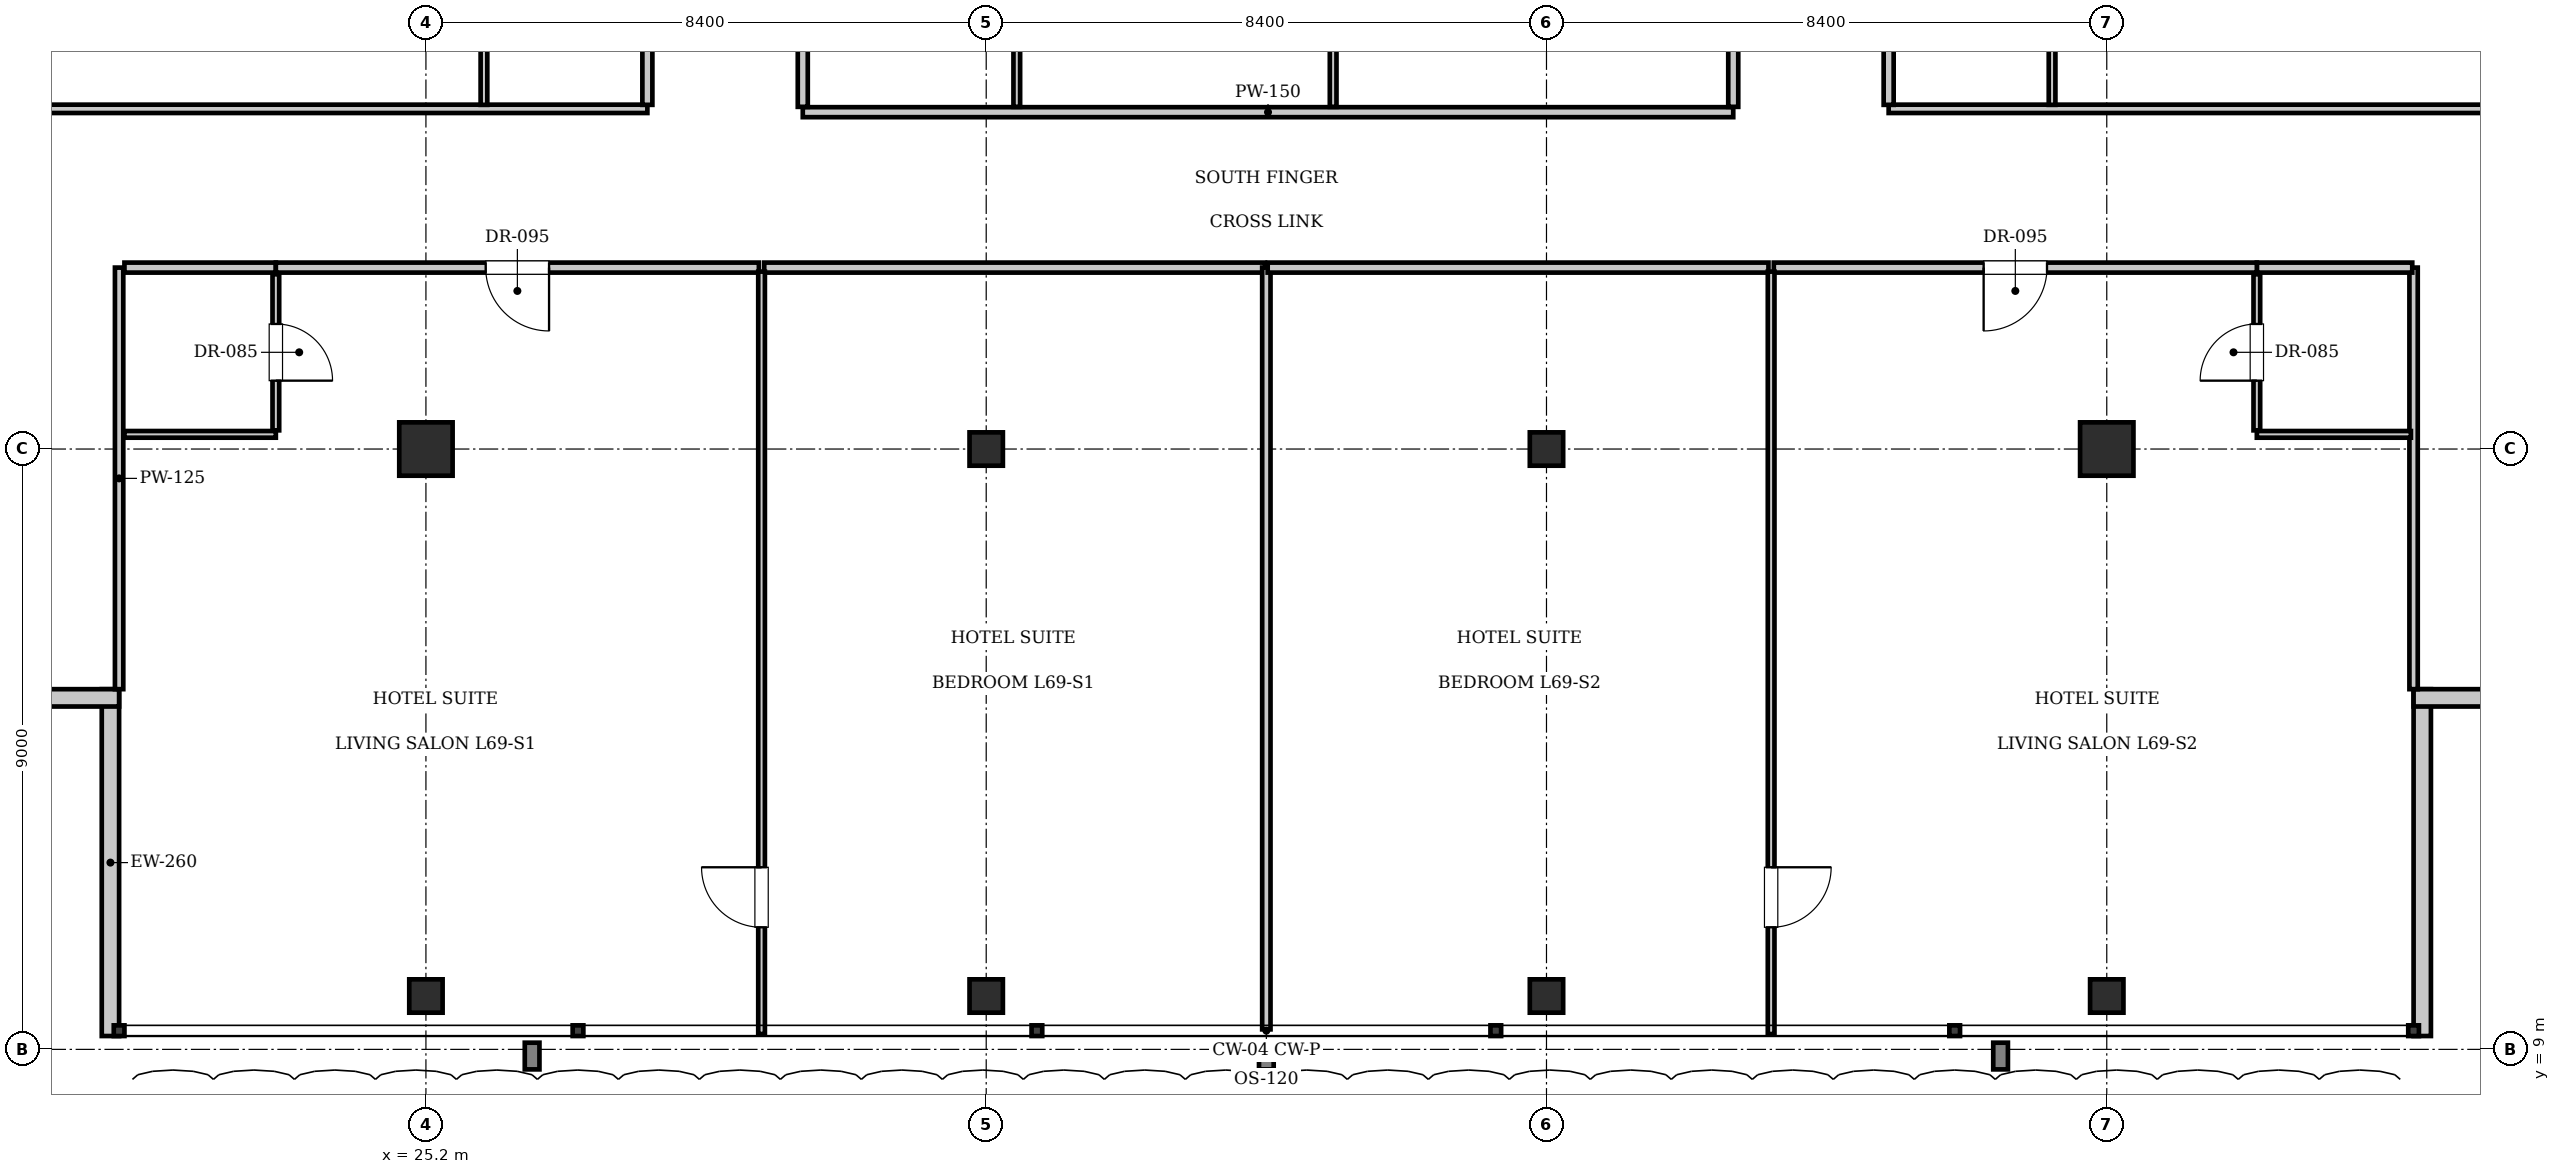
"""IFC4 building model, lengths in metres.
Left out: names, types, materials, properties, quantities, classifications, styles, units other than length and angle.
Written with IfcOpenShell. Run it as: python <this file> out.ifc"""

import sys

from ifc_helpers import new_model, si_unit, direction, frame, frame_2d, origin, origin_2d, place, context, subcontext, project, spatial, rectangle, i_section, extrude, element, fill, save


model = new_model("IFC4")
c1 = context("Model", 3, precision=1e-05, world=origin(), true_north=direction((0.0, 1.0)))
c2 = subcontext(c1, "Body", "Model", "MODEL_VIEW")
j1 = project(units=[si_unit("LENGTHUNIT", "METRE"), si_unit("PLANEANGLEUNIT", "RADIAN")], contexts=[c1])
p1 = place(None, origin())
s1 = spatial("IfcSite", under=j1, at=p1, CompositionType="ELEMENT")
p2 = place(p1, origin())
s2 = spatial("IfcBuilding", under=s1, at=p2, CompositionType="ELEMENT")
p3 = place(p2, frame((0.0, 0.0, 281.75)))
s3 = spatial("IfcBuildingStorey", under=s2, at=p3, CompositionType="ELEMENT", Elevation=281.75)
for number, where, z_axis, x_axis in (
    (1, (25.2, 18.0, 0.0), (0.0, 0.0, 1.0), (1.0, 0.0, 0.0)),
    (2, (50.4, 18.0, 0.0), (0.0, 0.0, 1.0), (1.0, 0.0, 0.0)),
):
    element("IfcColumn", number, at=place(p3, frame(where, z_axis=z_axis, x_axis=x_axis)), inside=s3, PredefinedType="COLUMN", context=c2, shape_type="SweptSolid", body=[
        extrude(rectangle(XDim=0.8, YDim=0.8, at=origin_2d()), origin(), (0.0, 0.0, 1.0), 3.85),
    ])
for number, where, z_axis, x_axis in (
    (3, (33.6, 18.0, 0.0), (0.0, 0.0, 1.0), (1.0, 0.0, 0.0)),
    (4, (42.0, 18.0, 0.0), (0.0, 0.0, 1.0), (1.0, 0.0, 0.0)),
    (5, (25.2, 9.8, 0.0), (0.0, 0.0, 1.0), (1.0, 0.0, 0.0)),
    (6, (33.6, 9.8, 0.0), (0.0, 0.0, 1.0), (1.0, 0.0, 0.0)),
    (7, (42.0, 9.8, 0.0), (0.0, 0.0, 1.0), (1.0, 0.0, 0.0)),
    (8, (50.4, 9.8, 0.0), (0.0, 0.0, 1.0), (1.0, 0.0, 0.0)),
):
    element("IfcColumn", number, at=place(p3, frame(where, z_axis=z_axis, x_axis=x_axis)), inside=s3, PredefinedType="COLUMN", context=c2, shape_type="SweptSolid", body=[
        extrude(i_section(OverallWidth=0.5, OverallDepth=0.5, WebThickness=0.022, FlangeThickness=0.032, at=origin_2d()), origin(), (0.0, 0.0, 1.0), 3.85),
    ])
p4 = place(p3, frame((20.47, 9.2, 0.0), z_axis=(0.0, 0.0, 1.0), x_axis=(0.0, 1.0, 0.0)))
e9 = element("IfcWall", 9, at=p4, inside=s3, PredefinedType="SOLIDWALL", context=c2, shape_type="SweptSolid", body=[
    extrude(rectangle(XDim=5.2, YDim=0.26, at=frame_2d((2.6, 0.0))), origin(), (0.0, 0.0, 1.0), 3.61),
])
p5 = place(p3, frame((20.6, 14.27, 0.0), z_axis=(0.0, 0.0, 1.0), x_axis=(-1.0, 0.0, 0.0)))
e10 = element("IfcWall", 10, at=p5, inside=s3, PredefinedType="SOLIDWALL", context=c2, shape_type="SweptSolid", body=[
    extrude(rectangle(XDim=5.2, YDim=0.26, at=frame_2d((2.6, 0.0))), origin(), (0.0, 0.0, 1.0), 3.61),
])
p6 = place(p5, frame((1.6, 0.0, 0.9)))
e11 = element("IfcOpeningElement", 11, at=p6, cuts=e10, PredefinedType="OPENING", context=c2, shape_type="SweptSolid", body=[
    extrude(rectangle(XDim=2.0, YDim=2.2, at=frame_2d((1.0, 1.1))), frame((0.0, 0.14, 0.0), z_axis=(0.0, -1.0, 0.0), x_axis=(1.0, 0.0, 0.0)), (0.0, 0.0, 1.0), 0.28),
])
p7 = place(p3, frame((55.13, 14.4, 0.0), z_axis=(0.0, 0.0, 1.0), x_axis=(0.0, -1.0, 0.0)))
e12 = element("IfcWall", 12, at=p7, inside=s3, PredefinedType="SOLIDWALL", context=c2, shape_type="SweptSolid", body=[
    extrude(rectangle(XDim=5.2, YDim=0.26, at=frame_2d((2.6, 0.0))), origin(), (0.0, 0.0, 1.0), 3.61),
])
p8 = place(p3, frame((60.2, 14.27, 0.0), z_axis=(0.0, 0.0, 1.0), x_axis=(-1.0, 0.0, 0.0)))
e13 = element("IfcWall", 13, at=p8, inside=s3, PredefinedType="SOLIDWALL", context=c2, shape_type="SweptSolid", body=[
    extrude(rectangle(XDim=5.2, YDim=0.26, at=frame_2d((2.6, 0.0))), origin(), (0.0, 0.0, 1.0), 3.61),
])
p9 = place(p8, frame((1.6, 0.0, 0.9)))
e14 = element("IfcOpeningElement", 14, at=p9, cuts=e13, PredefinedType="OPENING", context=c2, shape_type="SweptSolid", body=[
    extrude(rectangle(XDim=2.0, YDim=2.2, at=frame_2d((1.0, 1.1))), frame((0.0, 0.14, 0.0), z_axis=(0.0, -1.0, 0.0), x_axis=(1.0, 0.0, 0.0)), (0.0, 0.0, 1.0), 0.28),
])
p10 = place(p3, frame((30.85, 23.05, 0.0), z_axis=(0.0, 0.0, 1.0), x_axis=(1.0, 0.0, 0.0)))
e15 = element("IfcWall", 15, at=p10, inside=s3, PredefinedType="PARTITIONING", context=c2, shape_type="SweptSolid", body=[
    extrude(rectangle(XDim=13.95, YDim=0.15, at=frame_2d((6.975, 0.0))), origin(), (0.0, 0.0, 1.0), 3.61),
])
for number, where, z_axis, x_axis in (
    (16, (30.85, 23.13, 0.0), (0.0, 0.0, 1.0), (0.0, 1.0, 0.0)),
    (17, (44.8, 23.13, 0.0), (0.0, 0.0, 1.0), (0.0, 1.0, 0.0)),
):
    element("IfcWall", number, at=place(p3, frame(where, z_axis=z_axis, x_axis=x_axis)), inside=s3, PredefinedType="PARTITIONING", context=c2, shape_type="SweptSolid", body=[
        extrude(rectangle(XDim=7.89, YDim=0.15, at=frame_2d((3.945, 0.0))), origin(), (0.0, 0.0, 1.0), 3.61),
    ])
for number, where, z_axis, x_axis in (
    (18, (34.059, 23.13, 0.0), (0.0, 0.0, 1.0), (0.0, 1.0, 0.0)),
    (19, (38.802, 23.13, 0.0), (0.0, 0.0, 1.0), (0.0, 1.0, 0.0)),
):
    element("IfcWall", number, at=place(p3, frame(where, z_axis=z_axis, x_axis=x_axis)), inside=s3, PredefinedType="PARTITIONING", context=c2, shape_type="SweptSolid", body=[
        extrude(rectangle(XDim=7.89, YDim=0.1, at=frame_2d((3.945, 0.0))), origin(), (0.0, 0.0, 1.0), 3.61),
    ])
for number, where, z_axis, x_axis in (
    (20, (20.6, 14.4, 0.0), (0.0, 0.0, 1.0), (0.0, 1.0, 0.0)),
    (21, (55.0, 14.4, 0.0), (0.0, 0.0, 1.0), (0.0, 1.0, 0.0)),
):
    element("IfcWall", number, at=place(p3, frame(where, z_axis=z_axis, x_axis=x_axis)), inside=s3, PredefinedType="PARTITIONING", context=c2, shape_type="SweptSolid", body=[
        extrude(rectangle(XDim=6.32, YDim=0.125, at=frame_2d((3.16, 0.0))), origin(), (0.0, 0.0, 1.0), 3.61),
    ])
p11 = place(p3, frame((20.68, 20.72, 0.0), z_axis=(0.0, 0.0, 1.0), x_axis=(1.0, 0.0, 0.0)))
e22 = element("IfcWall", 22, at=p11, inside=s3, PredefinedType="PARTITIONING", context=c2, shape_type="SweptSolid", body=[
    extrude(rectangle(XDim=2.27, YDim=0.15, at=frame_2d((1.135, 0.0))), origin(), (0.0, 0.0, 1.0), 3.61),
])
p12 = place(p3, frame((20.68, 18.22, 0.0), z_axis=(0.0, 0.0, 1.0), x_axis=(1.0, 0.0, 0.0)))
e23 = element("IfcWall", 23, at=p12, inside=s3, PredefinedType="PARTITIONING", context=c2, shape_type="SweptSolid", body=[
    extrude(rectangle(XDim=2.27, YDim=0.1, at=frame_2d((1.135, 0.0))), origin(), (0.0, 0.0, 1.0), 3.61),
])
p13 = place(p3, frame((22.95, 18.28, 0.0), z_axis=(0.0, 0.0, 1.0), x_axis=(0.0, 1.0, 0.0)))
e24 = element("IfcWall", 24, at=p13, inside=s3, PredefinedType="PARTITIONING", context=c2, shape_type="SweptSolid", body=[
    extrude(rectangle(XDim=2.34, YDim=0.1, at=frame_2d((1.17, 0.0))), origin(), (0.0, 0.0, 1.0), 3.61),
])
p14 = place(p13, frame((0.745, 0.0, 0.0)))
e25 = element("IfcOpeningElement", 25, at=p14, cuts=e24, PredefinedType="OPENING", context=c2, shape_type="SweptSolid", body=[
    extrude(rectangle(XDim=0.85, YDim=2.1, at=frame_2d((0.425, 1.05))), frame((0.0, 0.06, 0.0), z_axis=(0.0, -1.0, 0.0), x_axis=(1.0, 0.0, 0.0)), (0.0, 0.0, 1.0), 0.12),
])
p15 = place(p3, frame((22.95, 20.72, 0.0), z_axis=(0.0, 0.0, 1.0), x_axis=(1.0, 0.0, 0.0)))
e26 = element("IfcWall", 26, at=p15, inside=s3, PredefinedType="PARTITIONING", context=c2, shape_type="SweptSolid", body=[
    extrude(rectangle(XDim=7.242, YDim=0.15, at=frame_2d((3.621, 0.0))), origin(), (0.0, 0.0, 1.0), 3.61),
])
p16 = place(p15, frame((3.146, 0.0, 0.0)))
e27 = element("IfcOpeningElement", 27, at=p16, cuts=e26, PredefinedType="OPENING", context=c2, shape_type="SweptSolid", body=[
    extrude(rectangle(XDim=0.95, YDim=2.15, at=frame_2d((0.475, 1.075))), frame((0.0, 0.085, 0.0), z_axis=(0.0, -1.0, 0.0), x_axis=(1.0, 0.0, 0.0)), (0.0, 0.0, 1.0), 0.17),
])
p17 = place(p3, frame((30.272, 20.72, 0.0), z_axis=(0.0, 0.0, 1.0), x_axis=(1.0, 0.0, 0.0)))
e28 = element("IfcWall", 28, at=p17, inside=s3, PredefinedType="PARTITIONING", context=c2, shape_type="SweptSolid", body=[
    extrude(rectangle(XDim=7.508, YDim=0.15, at=frame_2d((3.754, 0.0))), origin(), (0.0, 0.0, 1.0), 3.61),
])
p18 = place(p3, frame((30.232, 9.23, 0.0), z_axis=(0.0, 0.0, 1.0), x_axis=(0.0, 1.0, 0.0)))
e29 = element("IfcWall", 29, at=p18, inside=s3, PredefinedType="PARTITIONING", context=c2, shape_type="SweptSolid", body=[
    extrude(rectangle(XDim=11.43, YDim=0.1, at=frame_2d((5.715, 0.0))), origin(), (0.0, 0.0, 1.0), 3.61),
])
p19 = place(p18, frame((1.6, 0.0, 0.0)))
e30 = element("IfcOpeningElement", 30, at=p19, cuts=e29, PredefinedType="OPENING", context=c2, shape_type="SweptSolid", body=[
    extrude(rectangle(XDim=0.9, YDim=2.1, at=frame_2d((0.45, 1.05))), frame((0.0, 0.06, 0.0), z_axis=(0.0, -1.0, 0.0), x_axis=(1.0, 0.0, 0.0)), (0.0, 0.0, 1.0), 0.12),
])
p20 = place(p3, frame((37.8, 9.3, 0.0), z_axis=(0.0, 0.0, 1.0), x_axis=(0.0, 1.0, 0.0)))
e31 = element("IfcWall", 31, at=p20, inside=s3, PredefinedType="PARTITIONING", context=c2, shape_type="SweptSolid", body=[
    extrude(rectangle(XDim=11.42, YDim=0.125, at=frame_2d((5.71, 0.0))), origin(), (0.0, 0.0, 1.0), 3.3),
])
p21 = place(p3, frame((52.65, 20.72, 0.0), z_axis=(0.0, 0.0, 1.0), x_axis=(1.0, 0.0, 0.0)))
e32 = element("IfcWall", 32, at=p21, inside=s3, PredefinedType="PARTITIONING", context=c2, shape_type="SweptSolid", body=[
    extrude(rectangle(XDim=2.33, YDim=0.15, at=frame_2d((1.165, 0.0))), origin(), (0.0, 0.0, 1.0), 3.61),
])
p22 = place(p3, frame((52.65, 18.22, 0.0), z_axis=(0.0, 0.0, 1.0), x_axis=(1.0, 0.0, 0.0)))
e33 = element("IfcWall", 33, at=p22, inside=s3, PredefinedType="PARTITIONING", context=c2, shape_type="SweptSolid", body=[
    extrude(rectangle(XDim=2.31, YDim=0.1, at=frame_2d((1.155, 0.0))), origin(), (0.0, 0.0, 1.0), 3.61),
])
p23 = place(p3, frame((52.65, 18.28, 0.0), z_axis=(0.0, 0.0, 1.0), x_axis=(0.0, 1.0, 0.0)))
e34 = element("IfcWall", 34, at=p23, inside=s3, PredefinedType="PARTITIONING", context=c2, shape_type="SweptSolid", body=[
    extrude(rectangle(XDim=2.34, YDim=0.1, at=frame_2d((1.17, 0.0))), origin(), (0.0, 0.0, 1.0), 3.61),
])
p24 = place(p23, frame((0.745, 0.0, 0.0)))
e35 = element("IfcOpeningElement", 35, at=p24, cuts=e34, PredefinedType="OPENING", context=c2, shape_type="SweptSolid", body=[
    extrude(rectangle(XDim=0.85, YDim=2.1, at=frame_2d((0.425, 1.05))), frame((0.0, 0.06, 0.0), z_axis=(0.0, -1.0, 0.0), x_axis=(1.0, 0.0, 0.0)), (0.0, 0.0, 1.0), 0.12),
])
p25 = place(p3, frame((37.82, 20.72, 0.0), z_axis=(0.0, 0.0, 1.0), x_axis=(1.0, 0.0, 0.0)))
e36 = element("IfcWall", 36, at=p25, inside=s3, PredefinedType="PARTITIONING", context=c2, shape_type="SweptSolid", body=[
    extrude(rectangle(XDim=7.508, YDim=0.15, at=frame_2d((3.754, 0.0))), origin(), (0.0, 0.0, 1.0), 3.61),
])
p26 = place(p3, frame((45.408, 20.72, 0.0), z_axis=(0.0, 0.0, 1.0), x_axis=(1.0, 0.0, 0.0)))
e37 = element("IfcWall", 37, at=p26, inside=s3, PredefinedType="PARTITIONING", context=c2, shape_type="SweptSolid", body=[
    extrude(rectangle(XDim=7.242, YDim=0.15, at=frame_2d((3.621, 0.0))), origin(), (0.0, 0.0, 1.0), 3.61),
])
p27 = place(p26, frame((3.146, 0.0, 0.0)))
e38 = element("IfcOpeningElement", 38, at=p27, cuts=e37, PredefinedType="OPENING", context=c2, shape_type="SweptSolid", body=[
    extrude(rectangle(XDim=0.95, YDim=2.15, at=frame_2d((0.475, 1.075))), frame((0.0, 0.085, 0.0), z_axis=(0.0, -1.0, 0.0), x_axis=(1.0, 0.0, 0.0)), (0.0, 0.0, 1.0), 0.17),
])
p28 = place(p3, frame((45.368, 9.23, 0.0), z_axis=(0.0, 0.0, 1.0), x_axis=(0.0, 1.0, 0.0)))
e39 = element("IfcWall", 39, at=p28, inside=s3, PredefinedType="PARTITIONING", context=c2, shape_type="SweptSolid", body=[
    extrude(rectangle(XDim=11.43, YDim=0.1, at=frame_2d((5.715, 0.0))), origin(), (0.0, 0.0, 1.0), 3.61),
])
p29 = place(p28, frame((1.6, 0.0, 0.0)))
e40 = element("IfcOpeningElement", 40, at=p29, cuts=e39, PredefinedType="OPENING", context=c2, shape_type="SweptSolid", body=[
    extrude(rectangle(XDim=0.9, YDim=2.1, at=frame_2d((0.45, 1.05))), frame((0.0, 0.06, 0.0), z_axis=(0.0, -1.0, 0.0), x_axis=(1.0, 0.0, 0.0)), (0.0, 0.0, 1.0), 0.12),
])
p30 = place(p3, frame((15.5, 23.1, 0.0), z_axis=(0.0, 0.0, 1.0), x_axis=(1.0, 0.0, 0.0)))
e41 = element("IfcWall", 41, at=p30, inside=s3, PredefinedType="PARTITIONING", context=c2, shape_type="SweptSolid", body=[
    extrude(rectangle(XDim=13.02, YDim=0.125, at=frame_2d((6.51, 0.0))), origin(), (0.0, 0.0, 1.0), 3.61),
])
p31 = place(p3, frame((47.13, 23.1, 0.0), z_axis=(0.0, 0.0, 1.0), x_axis=(1.0, 0.0, 0.0)))
e42 = element("IfcWall", 42, at=p31, inside=s3, PredefinedType="PARTITIONING", context=c2, shape_type="SweptSolid", body=[
    extrude(rectangle(XDim=12.97, YDim=0.125, at=frame_2d((6.485, 0.0))), origin(), (0.0, 0.0, 1.0), 3.61),
])
p32 = place(p3, frame((28.52, 23.16, 0.0), z_axis=(0.0, 0.0, 1.0), x_axis=(0.0, 1.0, 0.0)))
e43 = element("IfcWall", 43, at=p32, inside=s3, PredefinedType="PARTITIONING", context=c2, shape_type="SweptSolid", body=[
    extrude(rectangle(XDim=1.89, YDim=0.15, at=frame_2d((0.945, 0.0))), origin(), (0.0, 0.0, 1.0), 3.61),
])
p33 = place(p3, frame((26.07, 23.16, 0.0), z_axis=(0.0, 0.0, 1.0), x_axis=(0.0, 1.0, 0.0)))
e44 = element("IfcWall", 44, at=p33, inside=s3, PredefinedType="PARTITIONING", context=c2, shape_type="SweptSolid", body=[
    extrude(rectangle(XDim=1.89, YDim=0.1, at=frame_2d((0.945, 0.0))), origin(), (0.0, 0.0, 1.0), 3.61),
])
p34 = place(p3, frame((47.13, 23.16, 0.0), z_axis=(0.0, 0.0, 1.0), x_axis=(0.0, 1.0, 0.0)))
e45 = element("IfcWall", 45, at=p34, inside=s3, PredefinedType="PARTITIONING", context=c2, shape_type="SweptSolid", body=[
    extrude(rectangle(XDim=1.89, YDim=0.15, at=frame_2d((0.945, 0.0))), origin(), (0.0, 0.0, 1.0), 3.61),
])
p35 = place(p3, frame((49.58, 23.16, 0.0), z_axis=(0.0, 0.0, 1.0), x_axis=(0.0, 1.0, 0.0)))
e46 = element("IfcWall", 46, at=p35, inside=s3, PredefinedType="PARTITIONING", context=c2, shape_type="SweptSolid", body=[
    extrude(rectangle(XDim=1.89, YDim=0.1, at=frame_2d((0.945, 0.0))), origin(), (0.0, 0.0, 1.0), 3.61),
])
p36 = place(p14, frame((0.85, 0.0, 0.0), z_axis=(0.0, 0.0, 1.0), x_axis=(-1.0, 0.0, 0.0)))
e47 = element("IfcDoor", 47, at=p36, inside=s3, OperationType="SINGLE_SWING_RIGHT", PredefinedType="DOOR", context=c2, shape_type="SweptSolid", body=[
    extrude(rectangle(XDim=0.85, YDim=2.1, at=frame_2d((0.425, 1.05))), frame((0.0, 0.025, 0.0), z_axis=(0.0, -1.0, 0.0), x_axis=(1.0, 0.0, 0.0)), (0.0, 0.0, 1.0), 0.05),
])
fill(e25, e47)
p37 = place(p16, frame((0.95, 0.0, 0.0), z_axis=(0.0, 0.0, 1.0), x_axis=(-1.0, 0.0, 0.0)))
e48 = element("IfcDoor", 48, at=p37, inside=s3, OperationType="SINGLE_SWING_LEFT", PredefinedType="DOOR", context=c2, shape_type="SweptSolid", body=[
    extrude(rectangle(XDim=0.95, YDim=2.15, at=frame_2d((0.475, 1.075))), frame((0.0, 0.025, 0.0), z_axis=(0.0, -1.0, 0.0), x_axis=(1.0, 0.0, 0.0)), (0.0, 0.0, 1.0), 0.05),
])
fill(e27, e48)
p38 = place(p19, origin())
e49 = element("IfcDoor", 49, at=p38, inside=s3, OperationType="SINGLE_SWING_RIGHT", PredefinedType="DOOR", context=c2, shape_type="SweptSolid", body=[
    extrude(rectangle(XDim=0.9, YDim=2.1, at=frame_2d((0.45, 1.05))), frame((0.0, 0.025, 0.0), z_axis=(0.0, -1.0, 0.0), x_axis=(1.0, 0.0, 0.0)), (0.0, 0.0, 1.0), 0.05),
])
fill(e30, e49)
p39 = place(p24, origin())
e50 = element("IfcDoor", 50, at=p39, inside=s3, OperationType="SINGLE_SWING_LEFT", PredefinedType="DOOR", context=c2, shape_type="SweptSolid", body=[
    extrude(rectangle(XDim=0.85, YDim=2.1, at=frame_2d((0.425, 1.05))), frame((0.0, 0.025, 0.0), z_axis=(0.0, -1.0, 0.0), x_axis=(1.0, 0.0, 0.0)), (0.0, 0.0, 1.0), 0.05),
])
fill(e35, e50)
p40 = place(p27, frame((0.95, 0.0, 0.0), z_axis=(0.0, 0.0, 1.0), x_axis=(-1.0, 0.0, 0.0)))
e51 = element("IfcDoor", 51, at=p40, inside=s3, OperationType="SINGLE_SWING_RIGHT", PredefinedType="DOOR", context=c2, shape_type="SweptSolid", body=[
    extrude(rectangle(XDim=0.95, YDim=2.15, at=frame_2d((0.475, 1.075))), frame((0.0, 0.025, 0.0), z_axis=(0.0, -1.0, 0.0), x_axis=(1.0, 0.0, 0.0)), (0.0, 0.0, 1.0), 0.05),
])
fill(e38, e51)
p41 = place(p29, frame((0.9, 0.0, 0.0), z_axis=(0.0, 0.0, 1.0), x_axis=(-1.0, 0.0, 0.0)))
e52 = element("IfcDoor", 52, at=p41, inside=s3, OperationType="SINGLE_SWING_LEFT", PredefinedType="DOOR", context=c2, shape_type="SweptSolid", body=[
    extrude(rectangle(XDim=0.9, YDim=2.1, at=frame_2d((0.45, 1.05))), frame((0.0, 0.025, 0.0), z_axis=(0.0, -1.0, 0.0), x_axis=(1.0, 0.0, 0.0)), (0.0, 0.0, 1.0), 0.05),
])
fill(e40, e52)
save(model, sys.argv[1])
